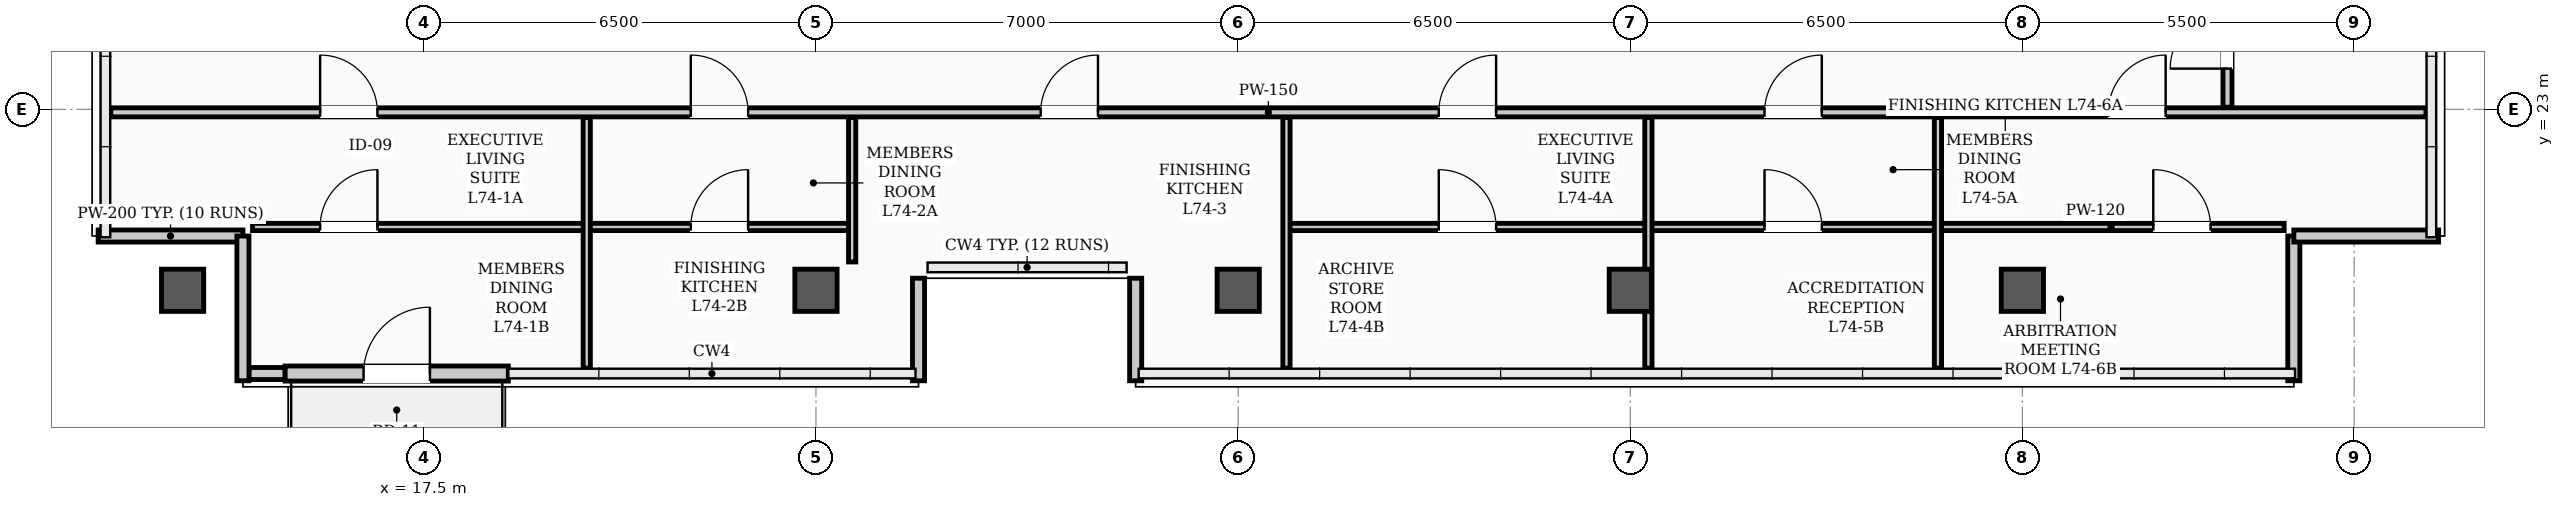
"""IFC4 building model, lengths in metres.
Left out: names, types, materials, properties, quantities, classifications, styles, units other than length and angle.
Written with IfcOpenShell. Run it as: python <this file> out.ifc"""

import sys

from ifc_helpers import new_model, si_unit, direction, frame, frame_2d, origin, origin_2d, place, context, subcontext, project, spatial, rectangle, hollow_rectangle, extrude, element, fill, save


model = new_model("IFC4")
c1 = context("Model", 3, precision=1e-05, world=origin(), true_north=direction((0.0, 1.0)))
c2 = subcontext(c1, "Body", "Model", "MODEL_VIEW")
j1 = project(units=[si_unit("LENGTHUNIT", "METRE"), si_unit("PLANEANGLEUNIT", "RADIAN")], contexts=[c1])
p1 = place(None, origin())
s1 = spatial("IfcSite", under=j1, at=p1, CompositionType="ELEMENT")
p2 = place(p1, origin())
s2 = spatial("IfcBuilding", under=s1, at=p2, CompositionType="ELEMENT")
p3 = place(p2, frame((0.0, 0.0, 296.9)))
s3 = spatial("IfcBuildingStorey", under=s2, at=p3, CompositionType="ELEMENT", Elevation=296.9)
for number, where, z_axis, x_axis in (
    (1, (13.5, 20.0, 0.0), (0.0, 0.0, 1.0), (1.0, 0.0, 0.0)),
    (2, (24.0, 20.0, 0.0), (0.0, 0.0, 1.0), (1.0, 0.0, 0.0)),
    (3, (31.0, 20.0, 0.0), (0.0, 0.0, 1.0), (1.0, 0.0, 0.0)),
    (4, (37.5, 20.0, 0.0), (0.0, 0.0, 1.0), (1.0, 0.0, 0.0)),
    (5, (44.0, 20.0, 0.0), (0.0, 0.0, 1.0), (1.0, 0.0, 0.0)),
):
    element("IfcColumn", number, at=place(p3, frame(where, z_axis=z_axis, x_axis=x_axis)), inside=s3, PredefinedType="COLUMN", context=c2, shape_type="SweptSolid", body=[
        extrude(hollow_rectangle(XDim=0.7, YDim=0.7, WallThickness=0.028, InnerFilletRadius=0.014, OuterFilletRadius=0.042, at=origin_2d()), origin(), (0.0, 0.0, 1.0), 3.9),
    ])
p4 = place(p3, frame((14.6, 18.62, 0.0), z_axis=(0.0, 0.0, 1.0), x_axis=(1.0, 0.0, 0.0)))
e6 = element("IfcWall", 6, at=p4, inside=s3, PredefinedType="PARAPET", context=c2, shape_type="SweptSolid", body=[
    extrude(rectangle(XDim=0.6, YDim=0.2, at=frame_2d((0.3, 0.0))), origin(), (0.0, 0.0, 1.0), 1.2),
])
for number, where, z_axis, x_axis in (
    (7, (12.1, 20.9, 0.0), (0.0, 0.0, 1.0), (1.0, 0.0, 0.0)),
    (8, (14.5, 20.9, 0.0), (0.0, 0.0, 1.0), (0.0, -1.0, 0.0)),
    (9, (48.5, 18.5, 0.0), (0.0, 0.0, 1.0), (0.0, 1.0, 0.0)),
    (10, (48.5, 20.9, 0.0), (0.0, 0.0, 1.0), (1.0, 0.0, 0.0)),
):
    element("IfcWall", number, at=place(p3, frame(where, z_axis=z_axis, x_axis=x_axis)), inside=s3, PredefinedType="PARAPET", context=c2, shape_type="SweptSolid", body=[
        extrude(rectangle(XDim=2.4, YDim=0.2, at=frame_2d((1.2, 0.0))), origin(), (0.0, 0.0, 1.0), 1.2),
    ])
for number, where, z_axis, x_axis in (
    (11, (25.7, 18.5, 0.0), (0.0, 0.0, 1.0), (0.0, 1.0, 0.0)),
    (12, (29.3, 20.2, 0.0), (0.0, 0.0, 1.0), (0.0, -1.0, 0.0)),
):
    element("IfcWall", number, at=place(p3, frame(where, z_axis=z_axis, x_axis=x_axis)), inside=s3, PredefinedType="PARAPET", context=c2, shape_type="SweptSolid", body=[
        extrude(rectangle(XDim=1.7, YDim=0.2, at=frame_2d((0.85, 0.0))), origin(), (0.0, 0.0, 1.0), 1.2),
    ])
p5 = place(p3, frame((15.2, 18.62, 0.0), z_axis=(0.0, 0.0, 1.0), x_axis=(1.0, 0.0, 0.0)))
e13 = element("IfcWall", 13, at=p5, inside=s3, PredefinedType="STANDARD", context=c2, shape_type="SweptSolid", body=[
    extrude(rectangle(XDim=3.7, YDim=0.25, at=frame_2d((1.85, 0.0))), origin(), (0.0, 0.0, 1.0), 3.18),
])
p6 = place(p5, frame((1.3, 0.0, 0.0)))
e14 = element("IfcOpeningElement", 14, at=p6, cuts=e13, PredefinedType="OPENING", context=c2, shape_type="SweptSolid", body=[
    extrude(rectangle(XDim=1.1, YDim=2.2, at=frame_2d((0.55, 1.1))), frame((0.0, 0.135, 0.0), z_axis=(0.0, -1.0, 0.0), x_axis=(1.0, 0.0, 0.0)), (0.0, 0.0, 1.0), 0.27),
])
p7 = place(p3, frame((12.31, 22.95, 0.0), z_axis=(0.0, 0.0, 1.0), x_axis=(1.0, 0.0, 0.0)))
e15 = element("IfcWall", 15, at=p7, inside=s3, PredefinedType="PARTITIONING", context=c2, shape_type="SweptSolid", body=[
    extrude(rectangle(XDim=38.38, YDim=0.15, at=frame_2d((19.19, 0.0))), origin(), (0.0, 0.0, 1.0), 3.2),
])
p8 = place(p7, frame((3.47, 0.0, 0.0)))
e16 = element("IfcOpeningElement", 16, at=p8, cuts=e15, PredefinedType="OPENING", context=c2, shape_type="SweptSolid", body=[
    extrude(rectangle(XDim=0.95, YDim=2.08, at=frame_2d((0.475, 1.04))), frame((0.0, 0.085, 0.0), z_axis=(0.0, -1.0, 0.0), x_axis=(1.0, 0.0, 0.0)), (0.0, 0.0, 1.0), 0.17),
])
p9 = place(p7, frame((9.615, 0.0, 0.0)))
e17 = element("IfcOpeningElement", 17, at=p9, cuts=e15, PredefinedType="OPENING", context=c2, shape_type="SweptSolid", body=[
    extrude(rectangle(XDim=0.95, YDim=2.08, at=frame_2d((0.475, 1.04))), frame((0.0, 0.085, 0.0), z_axis=(0.0, -1.0, 0.0), x_axis=(1.0, 0.0, 0.0)), (0.0, 0.0, 1.0), 0.17),
])
p10 = place(p7, frame((15.415, 0.0, 0.0)))
e18 = element("IfcOpeningElement", 18, at=p10, cuts=e15, PredefinedType="OPENING", context=c2, shape_type="SweptSolid", body=[
    extrude(rectangle(XDim=0.95, YDim=2.08, at=frame_2d((0.475, 1.04))), frame((0.0, 0.085, 0.0), z_axis=(0.0, -1.0, 0.0), x_axis=(1.0, 0.0, 0.0)), (0.0, 0.0, 1.0), 0.17),
])
p11 = place(p7, frame((22.015, 0.0, 0.0)))
e19 = element("IfcOpeningElement", 19, at=p11, cuts=e15, PredefinedType="OPENING", context=c2, shape_type="SweptSolid", body=[
    extrude(rectangle(XDim=0.95, YDim=2.08, at=frame_2d((0.475, 1.04))), frame((0.0, 0.085, 0.0), z_axis=(0.0, -1.0, 0.0), x_axis=(1.0, 0.0, 0.0)), (0.0, 0.0, 1.0), 0.17),
])
p12 = place(p7, frame((27.415, 0.0, 0.0)))
e20 = element("IfcOpeningElement", 20, at=p12, cuts=e15, PredefinedType="OPENING", context=c2, shape_type="SweptSolid", body=[
    extrude(rectangle(XDim=0.95, YDim=2.08, at=frame_2d((0.475, 1.04))), frame((0.0, 0.085, 0.0), z_axis=(0.0, -1.0, 0.0), x_axis=(1.0, 0.0, 0.0)), (0.0, 0.0, 1.0), 0.17),
])
p13 = place(p7, frame((33.115, 0.0, 0.0)))
e21 = element("IfcOpeningElement", 21, at=p13, cuts=e15, PredefinedType="OPENING", context=c2, shape_type="SweptSolid", body=[
    extrude(rectangle(XDim=0.95, YDim=2.08, at=frame_2d((0.475, 1.04))), frame((0.0, 0.085, 0.0), z_axis=(0.0, -1.0, 0.0), x_axis=(1.0, 0.0, 0.0)), (0.0, 0.0, 1.0), 0.17),
])
p14 = place(p3, frame((14.66, 21.05, 0.0), z_axis=(0.0, 0.0, 1.0), x_axis=(1.0, 0.0, 0.0)))
e22 = element("IfcWall", 22, at=p14, inside=s3, PredefinedType="PARTITIONING", context=c2, shape_type="SweptSolid", body=[
    extrude(rectangle(XDim=5.54, YDim=0.12, at=frame_2d((2.77, 0.0))), origin(), (0.0, 0.0, 1.0), 3.72),
])
p15 = place(p14, frame((1.12, 0.0, 0.0)))
e23 = element("IfcOpeningElement", 23, at=p15, cuts=e22, PredefinedType="OPENING", context=c2, shape_type="SweptSolid", body=[
    extrude(rectangle(XDim=0.95, YDim=2.08, at=frame_2d((0.475, 1.04))), frame((0.0, 0.07, 0.0), z_axis=(0.0, -1.0, 0.0), x_axis=(1.0, 0.0, 0.0)), (0.0, 0.0, 1.0), 0.14),
])
p16 = place(p3, frame((20.2, 21.05, 0.0), z_axis=(0.0, 0.0, 1.0), x_axis=(1.0, 0.0, 0.0)))
e24 = element("IfcWall", 24, at=p16, inside=s3, PredefinedType="PARTITIONING", context=c2, shape_type="SweptSolid", body=[
    extrude(rectangle(XDim=4.4, YDim=0.12, at=frame_2d((2.2, 0.0))), origin(), (0.0, 0.0, 1.0), 3.2),
])
p17 = place(p16, frame((1.725, 0.0, 0.0)))
e25 = element("IfcOpeningElement", 25, at=p17, cuts=e24, PredefinedType="OPENING", context=c2, shape_type="SweptSolid", body=[
    extrude(rectangle(XDim=0.95, YDim=2.08, at=frame_2d((0.475, 1.04))), frame((0.0, 0.07, 0.0), z_axis=(0.0, -1.0, 0.0), x_axis=(1.0, 0.0, 0.0)), (0.0, 0.0, 1.0), 0.14),
])
p18 = place(p3, frame((31.8, 21.05, 0.0), z_axis=(0.0, 0.0, 1.0), x_axis=(1.0, 0.0, 0.0)))
e26 = element("IfcWall", 26, at=p18, inside=s3, PredefinedType="PARTITIONING", context=c2, shape_type="SweptSolid", body=[
    extrude(rectangle(XDim=6.0, YDim=0.12, at=frame_2d((3.0, 0.0))), origin(), (0.0, 0.0, 1.0), 3.2),
])
p19 = place(p18, frame((2.525, 0.0, 0.0)))
e27 = element("IfcOpeningElement", 27, at=p19, cuts=e26, PredefinedType="OPENING", context=c2, shape_type="SweptSolid", body=[
    extrude(rectangle(XDim=0.95, YDim=2.08, at=frame_2d((0.475, 1.04))), frame((0.0, 0.07, 0.0), z_axis=(0.0, -1.0, 0.0), x_axis=(1.0, 0.0, 0.0)), (0.0, 0.0, 1.0), 0.14),
])
p20 = place(p3, frame((37.8, 21.05, 0.0), z_axis=(0.0, 0.0, 1.0), x_axis=(1.0, 0.0, 0.0)))
e28 = element("IfcWall", 28, at=p20, inside=s3, PredefinedType="PARTITIONING", context=c2, shape_type="SweptSolid", body=[
    extrude(rectangle(XDim=4.8, YDim=0.12, at=frame_2d((2.4, 0.0))), origin(), (0.0, 0.0, 1.0), 3.2),
])
p21 = place(p20, frame((1.925, 0.0, 0.0)))
e29 = element("IfcOpeningElement", 29, at=p21, cuts=e28, PredefinedType="OPENING", context=c2, shape_type="SweptSolid", body=[
    extrude(rectangle(XDim=0.95, YDim=2.08, at=frame_2d((0.475, 1.04))), frame((0.0, 0.07, 0.0), z_axis=(0.0, -1.0, 0.0), x_axis=(1.0, 0.0, 0.0)), (0.0, 0.0, 1.0), 0.14),
])
p22 = place(p3, frame((42.6, 21.05, 0.0), z_axis=(0.0, 0.0, 1.0), x_axis=(1.0, 0.0, 0.0)))
e30 = element("IfcWall", 30, at=p22, inside=s3, PredefinedType="PARTITIONING", context=c2, shape_type="SweptSolid", body=[
    extrude(rectangle(XDim=5.74, YDim=0.12, at=frame_2d((2.87, 0.0))), origin(), (0.0, 0.0, 1.0), 3.2),
])
p23 = place(p22, frame((3.57, 0.0, 0.0)))
e31 = element("IfcOpeningElement", 31, at=p23, cuts=e30, PredefinedType="OPENING", context=c2, shape_type="SweptSolid", body=[
    extrude(rectangle(XDim=0.95, YDim=2.08, at=frame_2d((0.475, 1.04))), frame((0.0, 0.07, 0.0), z_axis=(0.0, -1.0, 0.0), x_axis=(1.0, 0.0, 0.0)), (0.0, 0.0, 1.0), 0.14),
])
p24 = place(p3, frame((47.4, 23.035, 0.0), z_axis=(0.0, 0.0, 1.0), x_axis=(0.0, 1.0, 0.0)))
e32 = element("IfcWall", 32, at=p24, inside=s3, PredefinedType="PARTITIONING", context=c2, shape_type="SweptSolid", body=[
    extrude(rectangle(XDim=18.63, YDim=0.15, at=frame_2d((9.315, 0.0))), origin(), (0.0, 0.0, 1.0), 3.1),
])
p25 = place(p24, frame((0.64, 0.0, 0.0)))
e33 = element("IfcOpeningElement", 33, at=p25, cuts=e32, PredefinedType="OPENING", context=c2, shape_type="SweptSolid", body=[
    extrude(rectangle(XDim=0.95, YDim=2.08, at=frame_2d((0.475, 1.04))), frame((0.0, 0.085, 0.0), z_axis=(0.0, -1.0, 0.0), x_axis=(1.0, 0.0, 0.0)), (0.0, 0.0, 1.0), 0.17),
])
p26 = place(p24, frame((10.59, 0.0, 0.0)))
e34 = element("IfcOpeningElement", 34, at=p26, cuts=e32, PredefinedType="OPENING", context=c2, shape_type="SweptSolid", body=[
    extrude(rectangle(XDim=0.95, YDim=2.08, at=frame_2d((0.475, 1.04))), frame((0.0, 0.085, 0.0), z_axis=(0.0, -1.0, 0.0), x_axis=(1.0, 0.0, 0.0)), (0.0, 0.0, 1.0), 0.17),
])
p27 = place(p24, frame((15.365, 0.0, 0.0)))
e35 = element("IfcOpeningElement", 35, at=p27, cuts=e32, PredefinedType="OPENING", context=c2, shape_type="SweptSolid", body=[
    extrude(rectangle(XDim=0.95, YDim=2.08, at=frame_2d((0.475, 1.04))), frame((0.0, 0.085, 0.0), z_axis=(0.0, -1.0, 0.0), x_axis=(1.0, 0.0, 0.0)), (0.0, 0.0, 1.0), 0.17),
])
p28 = place(p3, frame((20.2, 18.71, 0.0), z_axis=(0.0, 0.0, 1.0), x_axis=(0.0, 1.0, 0.0)))
e36 = element("IfcWall", 36, at=p28, inside=s3, PredefinedType="PARTITIONING", context=c2, shape_type="SweptSolid", body=[
    extrude(rectangle(XDim=4.155, YDim=0.12, at=frame_2d((2.078, 0.0))), origin(), (0.0, 0.0, 1.0), 3.72),
])
p29 = place(p3, frame((24.6, 20.47, 0.0), z_axis=(0.0, 0.0, 1.0), x_axis=(0.0, 1.0, 0.0)))
e37 = element("IfcWall", 37, at=p29, inside=s3, PredefinedType="PARTITIONING", context=c2, shape_type="SweptSolid", body=[
    extrude(rectangle(XDim=2.395, YDim=0.12, at=frame_2d((1.198, 0.0))), origin(), (0.0, 0.0, 1.0), 3.1),
])
for number, where, z_axis, x_axis in (
    (38, (31.8, 18.71, 0.0), (0.0, 0.0, 1.0), (0.0, 1.0, 0.0)),
    (39, (37.8, 18.71, 0.0), (0.0, 0.0, 1.0), (0.0, 1.0, 0.0)),
    (40, (42.6, 18.71, 0.0), (0.0, 0.0, 1.0), (0.0, 1.0, 0.0)),
):
    element("IfcWall", number, at=place(p3, frame(where, z_axis=z_axis, x_axis=x_axis)), inside=s3, PredefinedType="PARTITIONING", context=c2, shape_type="SweptSolid", body=[
        extrude(rectangle(XDim=4.155, YDim=0.12, at=frame_2d((2.078, 0.0))), origin(), (0.0, 0.0, 1.0), 3.1),
    ])
p30 = place(p6, origin())
e41 = element("IfcDoor", 41, at=p30, inside=s3, OperationType="SINGLE_SWING_RIGHT", PredefinedType="DOOR", context=c2, shape_type="SweptSolid", body=[
    extrude(rectangle(XDim=1.1, YDim=2.2, at=frame_2d((0.55, 1.1))), frame((0.0, 0.025, 0.0), z_axis=(0.0, -1.0, 0.0), x_axis=(1.0, 0.0, 0.0)), (0.0, 0.0, 1.0), 0.05),
])
fill(e14, e41)
p31 = place(p15, origin())
e42 = element("IfcDoor", 42, at=p31, inside=s3, OperationType="SINGLE_SWING_RIGHT", PredefinedType="DOOR", context=c2, shape_type="SweptSolid", body=[
    extrude(rectangle(XDim=0.95, YDim=2.08, at=frame_2d((0.475, 1.04))), frame((0.0, 0.025, 0.0), z_axis=(0.0, -1.0, 0.0), x_axis=(1.0, 0.0, 0.0)), (0.0, 0.0, 1.0), 0.05),
])
fill(e23, e42)
p32 = place(p8, origin())
e43 = element("IfcDoor", 43, at=p32, inside=s3, OperationType="SINGLE_SWING_LEFT", PredefinedType="DOOR", context=c2, shape_type="SweptSolid", body=[
    extrude(rectangle(XDim=0.95, YDim=2.08, at=frame_2d((0.475, 1.04))), frame((0.0, 0.025, 0.0), z_axis=(0.0, -1.0, 0.0), x_axis=(1.0, 0.0, 0.0)), (0.0, 0.0, 1.0), 0.05),
])
fill(e16, e43)
p33 = place(p17, origin())
e44 = element("IfcDoor", 44, at=p33, inside=s3, OperationType="SINGLE_SWING_RIGHT", PredefinedType="DOOR", context=c2, shape_type="SweptSolid", body=[
    extrude(rectangle(XDim=0.95, YDim=2.08, at=frame_2d((0.475, 1.04))), frame((0.0, 0.025, 0.0), z_axis=(0.0, -1.0, 0.0), x_axis=(1.0, 0.0, 0.0)), (0.0, 0.0, 1.0), 0.05),
])
fill(e25, e44)
p34 = place(p9, origin())
e45 = element("IfcDoor", 45, at=p34, inside=s3, OperationType="SINGLE_SWING_LEFT", PredefinedType="DOOR", context=c2, shape_type="SweptSolid", body=[
    extrude(rectangle(XDim=0.95, YDim=2.08, at=frame_2d((0.475, 1.04))), frame((0.0, 0.025, 0.0), z_axis=(0.0, -1.0, 0.0), x_axis=(1.0, 0.0, 0.0)), (0.0, 0.0, 1.0), 0.05),
])
fill(e17, e45)
p35 = place(p10, origin())
e46 = element("IfcDoor", 46, at=p35, inside=s3, OperationType="SINGLE_SWING_RIGHT", PredefinedType="DOOR", context=c2, shape_type="SweptSolid", body=[
    extrude(rectangle(XDim=0.95, YDim=2.08, at=frame_2d((0.475, 1.04))), frame((0.0, 0.025, 0.0), z_axis=(0.0, -1.0, 0.0), x_axis=(1.0, 0.0, 0.0)), (0.0, 0.0, 1.0), 0.05),
])
fill(e18, e46)
p36 = place(p19, origin())
e47 = element("IfcDoor", 47, at=p36, inside=s3, OperationType="SINGLE_SWING_LEFT", PredefinedType="DOOR", context=c2, shape_type="SweptSolid", body=[
    extrude(rectangle(XDim=0.95, YDim=2.08, at=frame_2d((0.475, 1.04))), frame((0.0, 0.025, 0.0), z_axis=(0.0, -1.0, 0.0), x_axis=(1.0, 0.0, 0.0)), (0.0, 0.0, 1.0), 0.05),
])
fill(e27, e47)
p37 = place(p11, origin())
e48 = element("IfcDoor", 48, at=p37, inside=s3, OperationType="SINGLE_SWING_RIGHT", PredefinedType="DOOR", context=c2, shape_type="SweptSolid", body=[
    extrude(rectangle(XDim=0.95, YDim=2.08, at=frame_2d((0.475, 1.04))), frame((0.0, 0.025, 0.0), z_axis=(0.0, -1.0, 0.0), x_axis=(1.0, 0.0, 0.0)), (0.0, 0.0, 1.0), 0.05),
])
fill(e19, e48)
p38 = place(p21, origin())
e49 = element("IfcDoor", 49, at=p38, inside=s3, OperationType="SINGLE_SWING_LEFT", PredefinedType="DOOR", context=c2, shape_type="SweptSolid", body=[
    extrude(rectangle(XDim=0.95, YDim=2.08, at=frame_2d((0.475, 1.04))), frame((0.0, 0.025, 0.0), z_axis=(0.0, -1.0, 0.0), x_axis=(1.0, 0.0, 0.0)), (0.0, 0.0, 1.0), 0.05),
])
fill(e29, e49)
p39 = place(p12, origin())
e50 = element("IfcDoor", 50, at=p39, inside=s3, OperationType="SINGLE_SWING_RIGHT", PredefinedType="DOOR", context=c2, shape_type="SweptSolid", body=[
    extrude(rectangle(XDim=0.95, YDim=2.08, at=frame_2d((0.475, 1.04))), frame((0.0, 0.025, 0.0), z_axis=(0.0, -1.0, 0.0), x_axis=(1.0, 0.0, 0.0)), (0.0, 0.0, 1.0), 0.05),
])
fill(e20, e50)
p40 = place(p23, origin())
e51 = element("IfcDoor", 51, at=p40, inside=s3, OperationType="SINGLE_SWING_LEFT", PredefinedType="DOOR", context=c2, shape_type="SweptSolid", body=[
    extrude(rectangle(XDim=0.95, YDim=2.08, at=frame_2d((0.475, 1.04))), frame((0.0, 0.025, 0.0), z_axis=(0.0, -1.0, 0.0), x_axis=(1.0, 0.0, 0.0)), (0.0, 0.0, 1.0), 0.05),
])
fill(e31, e51)
p41 = place(p13, origin())
e52 = element("IfcDoor", 52, at=p41, inside=s3, OperationType="SINGLE_SWING_RIGHT", PredefinedType="DOOR", context=c2, shape_type="SweptSolid", body=[
    extrude(rectangle(XDim=0.95, YDim=2.08, at=frame_2d((0.475, 1.04))), frame((0.0, 0.025, 0.0), z_axis=(0.0, -1.0, 0.0), x_axis=(1.0, 0.0, 0.0)), (0.0, 0.0, 1.0), 0.05),
])
fill(e21, e52)
p42 = place(p25, origin())
e53 = element("IfcDoor", 53, at=p42, inside=s3, OperationType="SINGLE_SWING_LEFT", PredefinedType="DOOR", context=c2, shape_type="SweptSolid", body=[
    extrude(rectangle(XDim=0.95, YDim=2.08, at=frame_2d((0.475, 1.04))), frame((0.0, 0.025, 0.0), z_axis=(0.0, -1.0, 0.0), x_axis=(1.0, 0.0, 0.0)), (0.0, 0.0, 1.0), 0.05),
])
fill(e33, e53)
save(model, sys.argv[1])
